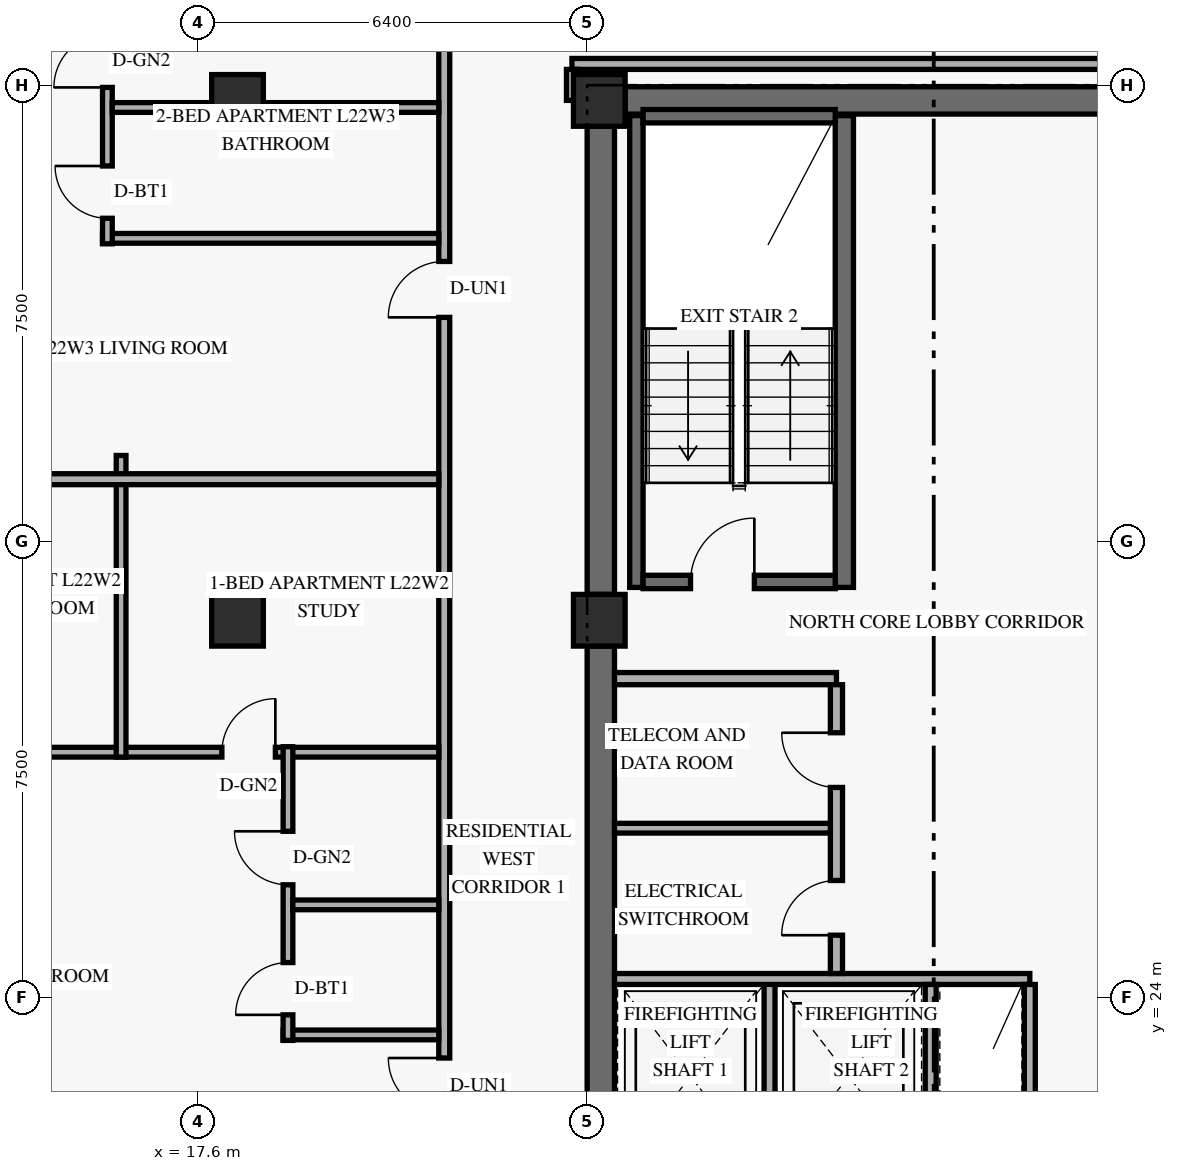
"""IFC4 building model, lengths in metres.
Left out: names, types, materials, properties, quantities, classifications, styles, units other than length and angle.
Written with IfcOpenShell. Run it as: python <this file> out.ifc"""

import sys

from ifc_helpers import new_model, si_unit, direction, frame, frame_2d, origin, origin_2d, place, context, subcontext, project, spatial, rectangle, extrude, element, fill, save


model = new_model("IFC4")
c1 = context("Model", 3, precision=1e-05, world=origin(), true_north=direction((0.0, 1.0)))
c2 = subcontext(c1, "Body", "Model", "MODEL_VIEW")
j1 = project(units=[si_unit("LENGTHUNIT", "METRE"), si_unit("PLANEANGLEUNIT", "RADIAN")], contexts=[c1])
p1 = place(None, origin())
s1 = spatial("IfcSite", under=j1, at=p1, CompositionType="ELEMENT")
p2 = place(p1, origin())
s2 = spatial("IfcBuilding", under=s1, at=p2, CompositionType="ELEMENT")
p3 = place(p2, frame((0.0, 0.0, 87.6)))
s3 = spatial("IfcBuildingStorey", under=s2, at=p3, CompositionType="ELEMENT", Elevation=87.6)
p4 = place(p3, frame((24.225, 17.975, 0.0), z_axis=(0.0, 0.0, 1.0), x_axis=(0.0, 1.0, 0.0)))
e1 = element("IfcWall", 1, at=p4, inside=s3, PredefinedType="SHEAR", context=c2, shape_type="SweptSolid", body=[
    extrude(rectangle(XDim=11.8, YDim=0.45, at=frame_2d((5.9, 0.0))), origin(), (0.0, 0.0, 1.0), 2.749),
])
p5 = place(p3, frame((24.225, 30.625, 0.0), z_axis=(0.0, 0.0, 1.0), x_axis=(0.0, 1.0, 0.0)))
e2 = element("IfcWall", 2, at=p5, inside=s3, PredefinedType="SHEAR", context=c2, shape_type="SweptSolid", body=[
    extrude(rectangle(XDim=7.7, YDim=0.45, at=frame_2d((3.85, 0.0))), origin(), (0.0, 0.0, 1.0), 2.749),
])
p6 = place(p3, frame((24.625, 38.75, 0.0), z_axis=(0.0, 0.0, 1.0), x_axis=(1.0, 0.0, 0.0)))
e3 = element("IfcWall", 3, at=p6, inside=s3, PredefinedType="SHEAR", context=c2, shape_type="SweptSolid", body=[
    extrude(rectangle(XDim=10.15, YDim=0.45, at=frame_2d((5.075, 0.0))), origin(), (0.0, 0.0, 1.0), 3.36),
])
p7 = place(p3, frame((24.81, 30.74, 0.0), z_axis=(0.0, 0.0, 1.0), x_axis=(0.0, 1.0, 0.0)))
e4 = element("IfcWall", 4, at=p7, inside=s3, PredefinedType="SHEAR", context=c2, shape_type="SweptSolid", body=[
    extrude(rectangle(XDim=7.76, YDim=0.22, at=frame_2d((3.88, 0.0))), origin(), (0.0, 0.0, 1.0), 3.36),
])
p8 = place(p3, frame((28.23, 30.74, 0.0), z_axis=(0.0, 0.0, 1.0), x_axis=(0.0, 1.0, 0.0)))
e5 = element("IfcWall", 5, at=p8, inside=s3, PredefinedType="SHEAR", context=c2, shape_type="SweptSolid", body=[
    extrude(rectangle(XDim=7.76, YDim=0.3, at=frame_2d((3.88, 0.0))), origin(), (0.0, 0.0, 1.0), 3.36),
])
p9 = place(p3, frame((24.92, 30.83, 0.0), z_axis=(0.0, 0.0, 1.0), x_axis=(1.0, 0.0, 0.0)))
e6 = element("IfcWall", 6, at=p9, inside=s3, PredefinedType="SHEAR", context=c2, shape_type="SweptSolid", body=[
    extrude(rectangle(XDim=3.16, YDim=0.22, at=frame_2d((1.58, 0.0))), origin(), (0.0, 0.0, 1.0), 3.36),
])
p10 = place(p9, frame((0.78, 0.0, 0.0)))
e7 = element("IfcOpeningElement", 7, at=p10, cuts=e6, PredefinedType="OPENING", context=c2, shape_type="SweptSolid", body=[
    extrude(rectangle(XDim=1.05, YDim=2.15, at=frame_2d((0.525, 1.075))), frame((0.0, 0.12, 0.0), z_axis=(0.0, -1.0, 0.0), x_axis=(1.0, 0.0, 0.0)), (0.0, 0.0, 1.0), 0.24),
])
p11 = place(p3, frame((24.92, 38.49, 0.0), z_axis=(0.0, 0.0, 1.0), x_axis=(1.0, 0.0, 0.0)))
e8 = element("IfcWall", 8, at=p11, inside=s3, PredefinedType="SHEAR", context=c2, shape_type="SweptSolid", body=[
    extrude(rectangle(XDim=3.16, YDim=0.22, at=frame_2d((1.58, 0.0))), origin(), (0.0, 0.0, 1.0), 3.36),
])
for number, where, z_axis, x_axis in (
    (9, (18.25, 30.2, 0.0), (0.0, 0.0, 1.0), (1.0, 0.0, 0.0)),
    (10, (18.25, 38.75, 0.0), (0.0, 0.0, 1.0), (1.0, 0.0, 0.0)),
    (11, (24.2, 30.2, 0.0), (0.0, 0.0, 1.0), (1.0, 0.0, 0.0)),
    (12, (24.2, 38.75, 0.0), (0.0, 0.0, 1.0), (1.0, 0.0, 0.0)),
):
    element("IfcColumn", number, at=place(p3, frame(where, z_axis=z_axis, x_axis=x_axis)), inside=s3, PredefinedType="COLUMN", context=c2, shape_type="SweptSolid", body=[
        extrude(rectangle(XDim=0.85, YDim=0.85, at=origin_2d()), origin(), (0.0, 0.0, 1.0), 3.6),
    ])
p12 = place(p3, frame((27.0, 21.19, 0.0), z_axis=(0.0, 0.0, 1.0), x_axis=(0.0, 1.0, 0.0)))
e13 = element("IfcWall", 13, at=p12, inside=s3, PredefinedType="STANDARD", context=c2, shape_type="SweptSolid", body=[
    extrude(rectangle(XDim=3.11, YDim=0.18, at=frame_2d((1.555, 0.0))), origin(), (0.0, 0.0, 1.0), 3.36),
])
p13 = place(p3, frame((24.45, 24.3, 0.0), z_axis=(0.0, 0.0, 1.0), x_axis=(1.0, 0.0, 0.0)))
e14 = element("IfcWall", 14, at=p13, inside=s3, PredefinedType="STANDARD", context=c2, shape_type="SweptSolid", body=[
    extrude(rectangle(XDim=6.83, YDim=0.18, at=frame_2d((3.415, 0.0))), origin(), (0.0, 0.0, 1.0), 3.36),
])
for number, where, z_axis, x_axis in (
    (15, (29.65, 21.19, 0.0), (0.0, 0.0, 1.0), (0.0, 1.0, 0.0)),
    (16, (31.28, 21.19, 0.0), (0.0, 0.0, 1.0), (0.0, 1.0, 0.0)),
):
    element("IfcWall", number, at=place(p3, frame(where, z_axis=z_axis, x_axis=x_axis)), inside=s3, PredefinedType="STANDARD", context=c2, shape_type="SweptSolid", body=[
        extrude(rectangle(XDim=3.02, YDim=0.18, at=frame_2d((1.51, 0.0))), origin(), (0.0, 0.0, 1.0), 3.36),
    ])
p14 = place(p3, frame((24.45, 29.24, 0.0), z_axis=(0.0, 0.0, 1.0), x_axis=(1.0, 0.0, 0.0)))
e17 = element("IfcWall", 17, at=p14, inside=s3, PredefinedType="STANDARD", context=c2, shape_type="SweptSolid", body=[
    extrude(rectangle(XDim=3.65, YDim=0.2, at=frame_2d((1.825, 0.0))), origin(), (0.0, 0.0, 1.0), 3.36),
])
p15 = place(p3, frame((28.1, 24.39, 0.0), z_axis=(0.0, 0.0, 1.0), x_axis=(0.0, 1.0, 0.0)))
e18 = element("IfcWall", 18, at=p15, inside=s3, PredefinedType="STANDARD", context=c2, shape_type="SweptSolid", body=[
    extrude(rectangle(XDim=4.75, YDim=0.2, at=frame_2d((2.375, 0.0))), origin(), (0.0, 0.0, 1.0), 3.36),
])
p16 = place(p15, frame((0.63, 0.0, 0.0)))
e19 = element("IfcOpeningElement", 19, at=p16, cuts=e18, PredefinedType="OPENING", context=c2, shape_type="SweptSolid", body=[
    extrude(rectangle(XDim=0.9, YDim=2.1, at=frame_2d((0.45, 1.05))), frame((0.0, 0.11, 0.0), z_axis=(0.0, -1.0, 0.0), x_axis=(1.0, 0.0, 0.0)), (0.0, 0.0, 1.0), 0.22),
])
p17 = place(p15, frame((3.06, 0.0, 0.0)))
e20 = element("IfcOpeningElement", 20, at=p17, cuts=e18, PredefinedType="OPENING", context=c2, shape_type="SweptSolid", body=[
    extrude(rectangle(XDim=0.9, YDim=2.1, at=frame_2d((0.45, 1.05))), frame((0.0, 0.11, 0.0), z_axis=(0.0, -1.0, 0.0), x_axis=(1.0, 0.0, 0.0)), (0.0, 0.0, 1.0), 0.22),
])
p18 = place(p3, frame((24.45, 26.78, 0.0), z_axis=(0.0, 0.0, 1.0), x_axis=(1.0, 0.0, 0.0)))
e21 = element("IfcWall", 21, at=p18, inside=s3, PredefinedType="PARTITIONING", context=c2, shape_type="SweptSolid", body=[
    extrude(rectangle(XDim=3.55, YDim=0.16, at=frame_2d((1.775, 0.0))), origin(), (0.0, 0.0, 1.0), 3.36),
])
p19 = place(p3, frame((21.65, 2.98, 0.0), z_axis=(0.0, 0.0, 1.0), x_axis=(0.0, 1.0, 0.0)))
e22 = element("IfcWall", 22, at=p19, inside=s3, PredefinedType="STANDARD", context=c2, shape_type="SweptSolid", body=[
    extrude(rectangle(XDim=42.04, YDim=0.18, at=frame_2d((21.02, 0.0))), origin(), (0.0, 0.0, 1.0), 2.731),
])
p20 = place(p19, frame((9.116, 0.0, 0.0)))
e23 = element("IfcOpeningElement", 23, at=p20, cuts=e22, PredefinedType="OPENING", context=c2, shape_type="SweptSolid", body=[
    extrude(rectangle(XDim=0.92, YDim=2.15, at=frame_2d((0.46, 1.075))), frame((0.0, 0.1, 0.0), z_axis=(0.0, -1.0, 0.0), x_axis=(1.0, 0.0, 0.0)), (0.0, 0.0, 1.0), 0.2),
])
p21 = place(p19, frame((19.1, 0.0, 0.0)))
e24 = element("IfcOpeningElement", 24, at=p21, cuts=e22, PredefinedType="OPENING", context=c2, shape_type="SweptSolid", body=[
    extrude(rectangle(XDim=0.92, YDim=2.15, at=frame_2d((0.46, 1.075))), frame((0.0, 0.1, 0.0), z_axis=(0.0, -1.0, 0.0), x_axis=(1.0, 0.0, 0.0)), (0.0, 0.0, 1.0), 0.2),
])
p22 = place(p19, frame((32.201, 0.0, 0.0)))
e25 = element("IfcOpeningElement", 25, at=p22, cuts=e22, PredefinedType="OPENING", context=c2, shape_type="SweptSolid", body=[
    extrude(rectangle(XDim=0.92, YDim=2.15, at=frame_2d((0.46, 1.075))), frame((0.0, 0.1, 0.0), z_axis=(0.0, -1.0, 0.0), x_axis=(1.0, 0.0, 0.0)), (0.0, 0.0, 1.0), 0.2),
])
p23 = place(p3, frame((23.75, 39.35, 0.0), z_axis=(0.0, 0.0, 1.0), x_axis=(1.0, 0.0, 0.0)))
e26 = element("IfcWall", 26, at=p23, inside=s3, PredefinedType="STANDARD", context=c2, shape_type="SweptSolid", body=[
    extrude(rectangle(XDim=11.67, YDim=0.18, at=frame_2d((5.835, 0.0))), origin(), (0.0, 0.0, 1.0), 2.731),
])
p24 = place(p3, frame((23.75, 38.75, 0.0), z_axis=(0.0, 0.0, 1.0), x_axis=(0.0, 1.0, 0.0)))
e27 = element("IfcWall", 27, at=p24, inside=s3, PredefinedType="STANDARD", context=c2, shape_type="SweptSolid", body=[
    extrude(rectangle(XDim=0.51, YDim=0.18, at=frame_2d((0.255, 0.0))), origin(), (0.0, 0.0, 1.0), 2.731),
])
p25 = place(p3, frame((10.08, 28.03, 0.0), z_axis=(0.0, 0.0, 1.0), x_axis=(1.0, 0.0, 0.0)))
e28 = element("IfcWall", 28, at=p25, inside=s3, PredefinedType="PARTITIONING", context=c2, shape_type="SweptSolid", body=[
    extrude(rectangle(XDim=11.48, YDim=0.16, at=frame_2d((5.74, 0.0))), origin(), (0.0, 0.0, 1.0), 2.731),
])
p26 = place(p25, frame((7.913, 0.0, 0.0)))
e29 = element("IfcOpeningElement", 29, at=p26, cuts=e28, PredefinedType="OPENING", context=c2, shape_type="SweptSolid", body=[
    extrude(rectangle(XDim=0.88, YDim=2.12, at=frame_2d((0.44, 1.06))), frame((0.0, 0.09, 0.0), z_axis=(0.0, -1.0, 0.0), x_axis=(1.0, 0.0, 0.0)), (0.0, 0.0, 1.0), 0.18),
])
p27 = place(p25, frame((2.568, 0.0, 0.0)))
e30 = element("IfcOpeningElement", 30, at=p27, cuts=e28, PredefinedType="OPENING", context=c2, shape_type="SweptSolid", body=[
    extrude(rectangle(XDim=0.9, YDim=2.14, at=frame_2d((0.45, 1.07))), frame((0.0, 0.09, 0.0), z_axis=(0.0, -1.0, 0.0), x_axis=(1.0, 0.0, 0.0)), (0.0, 0.0, 1.0), 0.18),
])
p28 = place(p3, frame((19.0, 23.38, 0.0), z_axis=(0.0, 0.0, 1.0), x_axis=(1.0, 0.0, 0.0)))
e31 = element("IfcWall", 31, at=p28, inside=s3, PredefinedType="PLUMBINGWALL", context=c2, shape_type="SweptSolid", body=[
    extrude(rectangle(XDim=2.56, YDim=0.16, at=frame_2d((1.28, 0.0))), origin(), (0.0, 0.0, 1.0), 3.36),
])
p29 = place(p3, frame((19.08, 23.29, 0.0), z_axis=(0.0, 0.0, 1.0), x_axis=(0.0, 1.0, 0.0)))
e32 = element("IfcWall", 32, at=p29, inside=s3, PredefinedType="PLUMBINGWALL", context=c2, shape_type="SweptSolid", body=[
    extrude(rectangle(XDim=4.83, YDim=0.16, at=frame_2d((2.415, 0.0))), origin(), (0.0, 0.0, 1.0), 3.36),
])
p30 = place(p29, frame((0.42, 0.0, 0.0)))
e33 = element("IfcOpeningElement", 33, at=p30, cuts=e32, PredefinedType="OPENING", context=c2, shape_type="SweptSolid", body=[
    extrude(rectangle(XDim=0.86, YDim=2.12, at=frame_2d((0.43, 1.06))), frame((0.0, 0.09, 0.0), z_axis=(0.0, -1.0, 0.0), x_axis=(1.0, 0.0, 0.0)), (0.0, 0.0, 1.0), 0.18),
])
p31 = place(p29, frame((2.559, 0.0, 0.0)))
e34 = element("IfcOpeningElement", 34, at=p31, cuts=e32, PredefinedType="OPENING", context=c2, shape_type="SweptSolid", body=[
    extrude(rectangle(XDim=0.88, YDim=2.12, at=frame_2d((0.44, 1.06))), frame((0.0, 0.09, 0.0), z_axis=(0.0, -1.0, 0.0), x_axis=(1.0, 0.0, 0.0)), (0.0, 0.0, 1.0), 0.18),
])
p32 = place(p3, frame((19.16, 25.519, 0.0), z_axis=(0.0, 0.0, 1.0), x_axis=(1.0, 0.0, 0.0)))
e35 = element("IfcWall", 35, at=p32, inside=s3, PredefinedType="PLUMBINGWALL", context=c2, shape_type="SweptSolid", body=[
    extrude(rectangle(XDim=2.4, YDim=0.16, at=frame_2d((1.2, 0.0))), origin(), (0.0, 0.0, 1.0), 3.36),
])
p33 = place(p3, frame((16.335, 27.95, 0.0), z_axis=(0.0, 0.0, 1.0), x_axis=(0.0, 1.0, 0.0)))
e36 = element("IfcWall", 36, at=p33, inside=s3, PredefinedType="PARTITIONING", context=c2, shape_type="SweptSolid", body=[
    extrude(rectangle(XDim=4.96, YDim=0.16, at=frame_2d((2.48, 0.0))), origin(), (0.0, 0.0, 1.0), 2.731),
])
p34 = place(p3, frame((10.08, 32.52, 0.0), z_axis=(0.0, 0.0, 1.0), x_axis=(1.0, 0.0, 0.0)))
e37 = element("IfcWall", 37, at=p34, inside=s3, PredefinedType="PARTITIONING", context=c2, shape_type="SweptSolid", body=[
    extrude(rectangle(XDim=11.48, YDim=0.18, at=frame_2d((5.74, 0.0))), origin(), (0.0, 0.0, 1.0), 2.731),
])
p35 = place(p3, frame((16.03, 36.481, 0.0), z_axis=(0.0, 0.0, 1.0), x_axis=(1.0, 0.0, 0.0)))
e38 = element("IfcWall", 38, at=p35, inside=s3, PredefinedType="PLUMBINGWALL", context=c2, shape_type="SweptSolid", body=[
    extrude(rectangle(XDim=5.53, YDim=0.16, at=frame_2d((2.765, 0.0))), origin(), (0.0, 0.0, 1.0), 2.731),
])
p36 = place(p3, frame((16.11, 36.392, 0.0), z_axis=(0.0, 0.0, 1.0), x_axis=(0.0, 1.0, 0.0)))
e39 = element("IfcWall", 39, at=p36, inside=s3, PredefinedType="PLUMBINGWALL", context=c2, shape_type="SweptSolid", body=[
    extrude(rectangle(XDim=4.858, YDim=0.16, at=frame_2d((2.429, 0.0))), origin(), (0.0, 0.0, 1.0), 2.731),
])
p37 = place(p36, frame((0.42, 0.0, 0.0)))
e40 = element("IfcOpeningElement", 40, at=p37, cuts=e39, PredefinedType="OPENING", context=c2, shape_type="SweptSolid", body=[
    extrude(rectangle(XDim=0.86, YDim=2.12, at=frame_2d((0.43, 1.06))), frame((0.0, 0.09, 0.0), z_axis=(0.0, -1.0, 0.0), x_axis=(1.0, 0.0, 0.0)), (0.0, 0.0, 1.0), 0.18),
])
p38 = place(p36, frame((2.572, 0.0, 0.0)))
e41 = element("IfcOpeningElement", 41, at=p38, cuts=e39, PredefinedType="OPENING", context=c2, shape_type="SweptSolid", body=[
    extrude(rectangle(XDim=0.88, YDim=2.12, at=frame_2d((0.44, 1.06))), frame((0.0, 0.09, 0.0), z_axis=(0.0, -1.0, 0.0), x_axis=(1.0, 0.0, 0.0)), (0.0, 0.0, 1.0), 0.18),
])
p39 = place(p3, frame((16.19, 38.634, 0.0), z_axis=(0.0, 0.0, 1.0), x_axis=(1.0, 0.0, 0.0)))
e42 = element("IfcWall", 42, at=p39, inside=s3, PredefinedType="PLUMBINGWALL", context=c2, shape_type="SweptSolid", body=[
    extrude(rectangle(XDim=5.37, YDim=0.16, at=frame_2d((2.685, 0.0))), origin(), (0.0, 0.0, 1.0), 2.731),
])
p40 = place(p10, origin())
e43 = element("IfcDoor", 43, at=p40, inside=s3, OperationType="SINGLE_SWING_RIGHT", PredefinedType="DOOR", context=c2, shape_type="SweptSolid", body=[
    extrude(rectangle(XDim=1.05, YDim=2.15, at=frame_2d((0.525, 1.075))), frame((0.0, 0.025, 0.0), z_axis=(0.0, -1.0, 0.0), x_axis=(1.0, 0.0, 0.0)), (0.0, 0.0, 1.0), 0.05),
])
fill(e7, e43)
p41 = place(p16, origin())
e44 = element("IfcDoor", 44, at=p41, inside=s3, OperationType="SINGLE_SWING_LEFT", PredefinedType="DOOR", context=c2, shape_type="SweptSolid", body=[
    extrude(rectangle(XDim=0.9, YDim=2.1, at=frame_2d((0.45, 1.05))), frame((0.0, 0.025, 0.0), z_axis=(0.0, -1.0, 0.0), x_axis=(1.0, 0.0, 0.0)), (0.0, 0.0, 1.0), 0.05),
])
fill(e19, e44)
p42 = place(p17, origin())
e45 = element("IfcDoor", 45, at=p42, inside=s3, OperationType="SINGLE_SWING_RIGHT", PredefinedType="DOOR", context=c2, shape_type="SweptSolid", body=[
    extrude(rectangle(XDim=0.9, YDim=2.1, at=frame_2d((0.45, 1.05))), frame((0.0, 0.025, 0.0), z_axis=(0.0, -1.0, 0.0), x_axis=(1.0, 0.0, 0.0)), (0.0, 0.0, 1.0), 0.05),
])
fill(e20, e45)
p43 = place(p21, origin())
e46 = element("IfcDoor", 46, at=p43, inside=s3, OperationType="SINGLE_SWING_RIGHT", PredefinedType="DOOR", context=c2, shape_type="SweptSolid", body=[
    extrude(rectangle(XDim=0.92, YDim=2.15, at=frame_2d((0.46, 1.075))), frame((0.0, 0.025, 0.0), z_axis=(0.0, -1.0, 0.0), x_axis=(1.0, 0.0, 0.0)), (0.0, 0.0, 1.0), 0.05),
])
fill(e24, e46)
p44 = place(p30, origin())
e47 = element("IfcDoor", 47, at=p44, inside=s3, OperationType="SINGLE_SWING_LEFT", PredefinedType="DOOR", context=c2, shape_type="SweptSolid", body=[
    extrude(rectangle(XDim=0.86, YDim=2.12, at=frame_2d((0.43, 1.06))), frame((0.0, 0.025, 0.0), z_axis=(0.0, -1.0, 0.0), x_axis=(1.0, 0.0, 0.0)), (0.0, 0.0, 1.0), 0.05),
])
fill(e33, e47)
p45 = place(p31, origin())
e48 = element("IfcDoor", 48, at=p45, inside=s3, OperationType="SINGLE_SWING_RIGHT", PredefinedType="DOOR", context=c2, shape_type="SweptSolid", body=[
    extrude(rectangle(XDim=0.88, YDim=2.12, at=frame_2d((0.44, 1.06))), frame((0.0, 0.025, 0.0), z_axis=(0.0, -1.0, 0.0), x_axis=(1.0, 0.0, 0.0)), (0.0, 0.0, 1.0), 0.05),
])
fill(e34, e48)
p46 = place(p26, origin())
e49 = element("IfcDoor", 49, at=p46, inside=s3, OperationType="SINGLE_SWING_RIGHT", PredefinedType="DOOR", context=c2, shape_type="SweptSolid", body=[
    extrude(rectangle(XDim=0.88, YDim=2.12, at=frame_2d((0.44, 1.06))), frame((0.0, 0.025, 0.0), z_axis=(0.0, -1.0, 0.0), x_axis=(1.0, 0.0, 0.0)), (0.0, 0.0, 1.0), 0.05),
])
fill(e29, e49)
p47 = place(p22, origin())
e50 = element("IfcDoor", 50, at=p47, inside=s3, OperationType="SINGLE_SWING_LEFT", PredefinedType="DOOR", context=c2, shape_type="SweptSolid", body=[
    extrude(rectangle(XDim=0.92, YDim=2.15, at=frame_2d((0.46, 1.075))), frame((0.0, 0.025, 0.0), z_axis=(0.0, -1.0, 0.0), x_axis=(1.0, 0.0, 0.0)), (0.0, 0.0, 1.0), 0.05),
])
fill(e25, e50)
p48 = place(p37, origin())
e51 = element("IfcDoor", 51, at=p48, inside=s3, OperationType="SINGLE_SWING_RIGHT", PredefinedType="DOOR", context=c2, shape_type="SweptSolid", body=[
    extrude(rectangle(XDim=0.86, YDim=2.12, at=frame_2d((0.43, 1.06))), frame((0.0, 0.025, 0.0), z_axis=(0.0, -1.0, 0.0), x_axis=(1.0, 0.0, 0.0)), (0.0, 0.0, 1.0), 0.05),
])
fill(e40, e51)
p49 = place(p38, origin())
e52 = element("IfcDoor", 52, at=p49, inside=s3, OperationType="SINGLE_SWING_LEFT", PredefinedType="DOOR", context=c2, shape_type="SweptSolid", body=[
    extrude(rectangle(XDim=0.88, YDim=2.12, at=frame_2d((0.44, 1.06))), frame((0.0, 0.025, 0.0), z_axis=(0.0, -1.0, 0.0), x_axis=(1.0, 0.0, 0.0)), (0.0, 0.0, 1.0), 0.05),
])
fill(e41, e52)
save(model, sys.argv[1])
